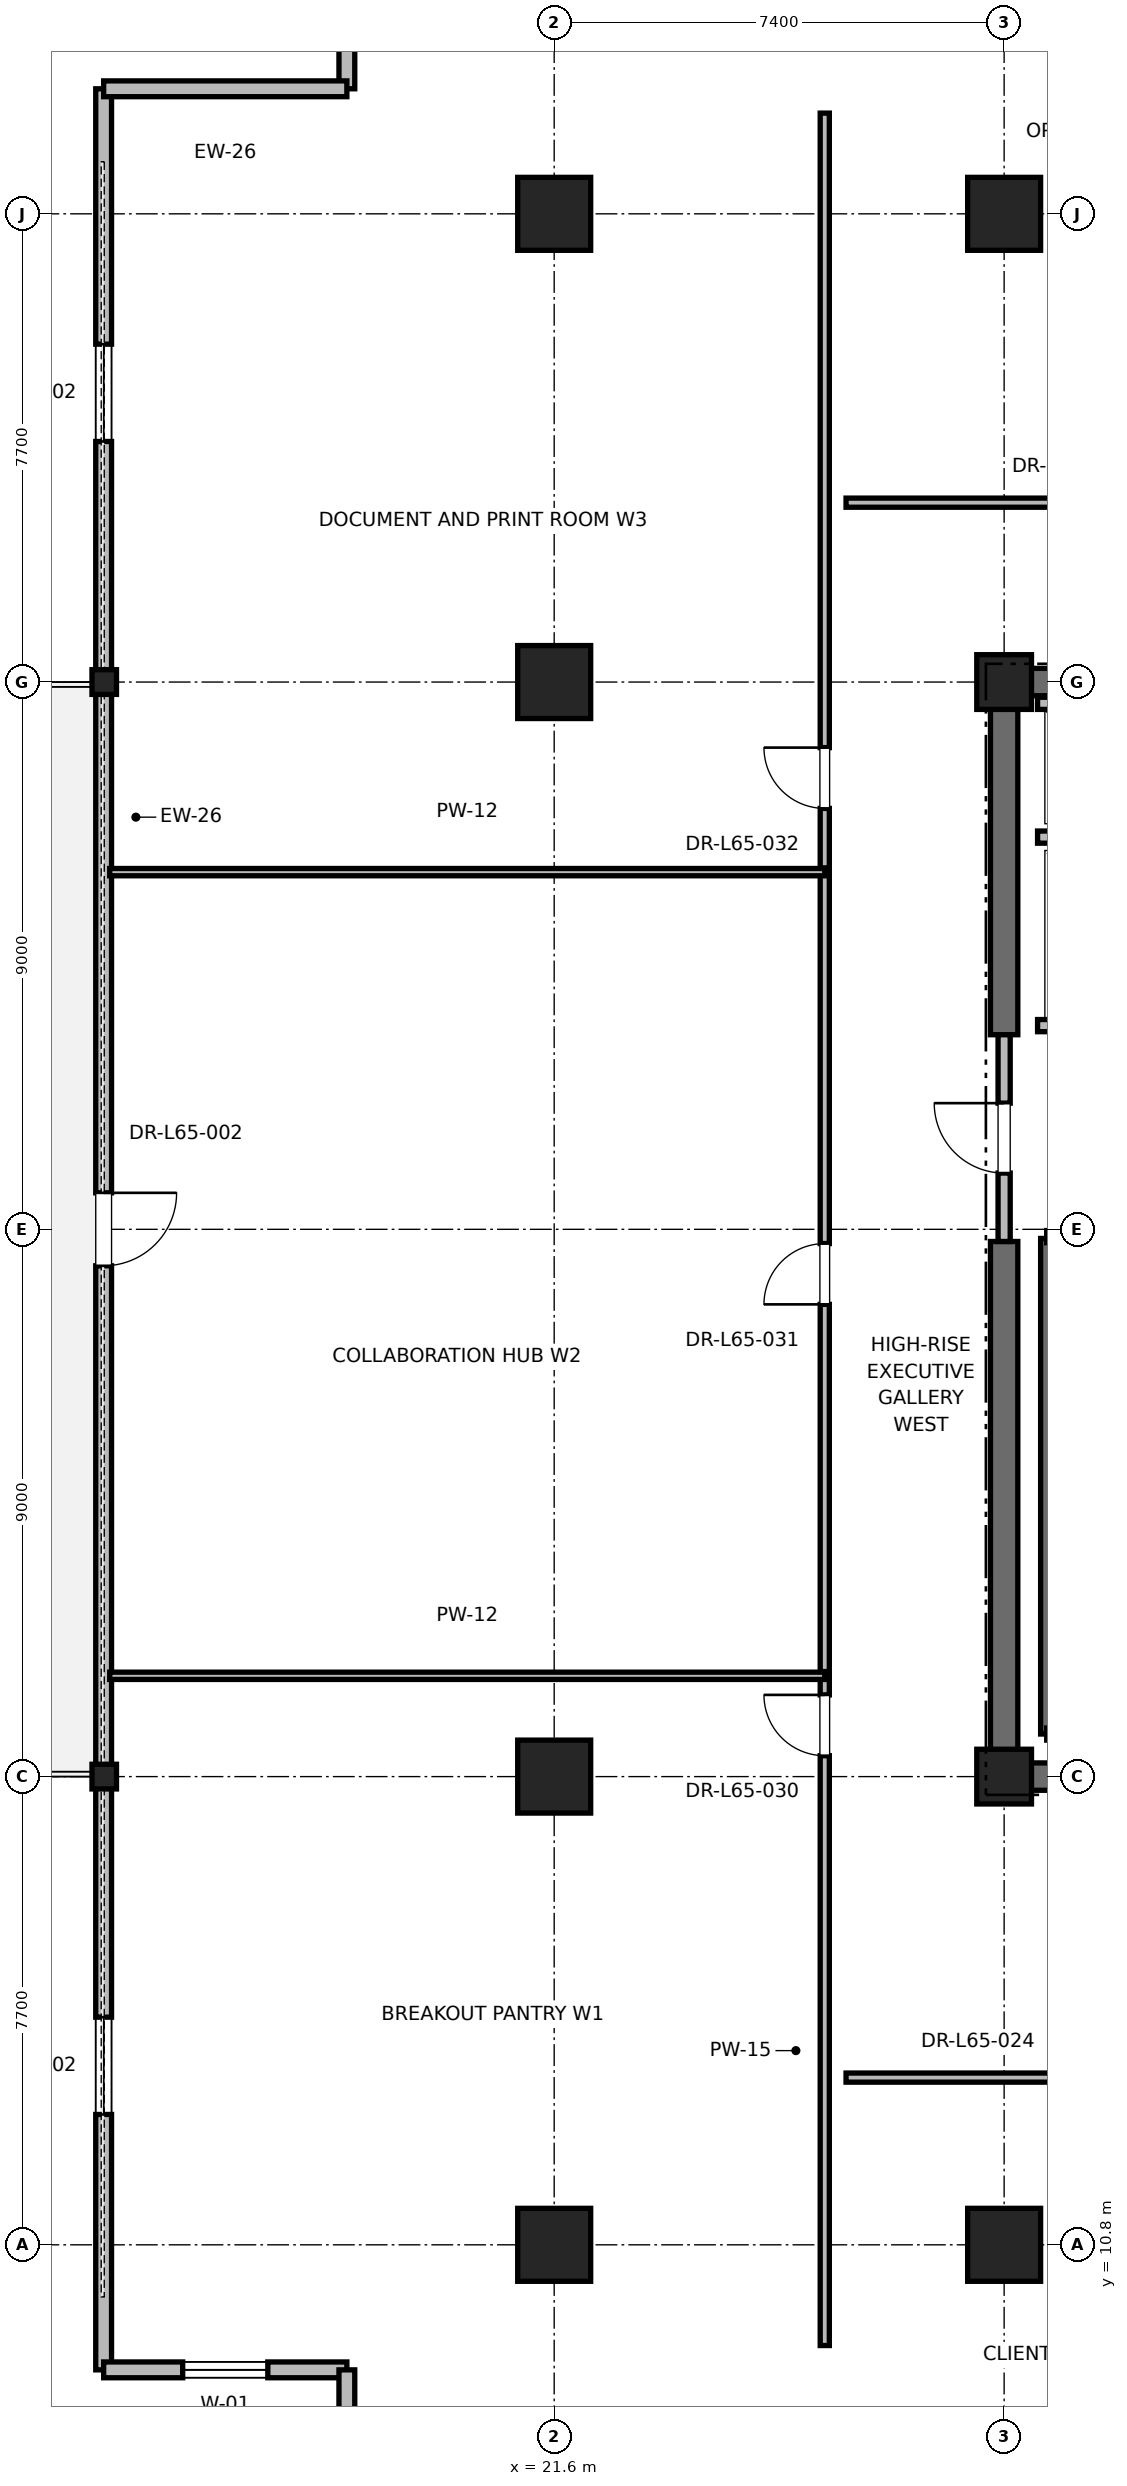
"""IFC4 building model, lengths in metres.
Left out: names, types, materials, properties, quantities, classifications, styles, units other than length and angle.
Written with IfcOpenShell. Run it as: python <this file> out.ifc"""

import sys

from ifc_helpers import new_model, si_unit, direction, frame, frame_2d, origin, origin_2d, place, context, subcontext, project, spatial, rectangle, i_section, extrude, element, fill, save


model = new_model("IFC4")
c1 = context("Model", 3, precision=1e-05, world=origin(), true_north=direction((0.0, 1.0)))
c2 = subcontext(c1, "Body", "Model", "MODEL_VIEW")
j1 = project(units=[si_unit("LENGTHUNIT", "METRE"), si_unit("PLANEANGLEUNIT", "RADIAN")], contexts=[c1])
p1 = place(None, origin())
s1 = spatial("IfcSite", under=j1, at=p1, CompositionType="ELEMENT")
p2 = place(p1, origin())
s2 = spatial("IfcBuilding", under=s1, at=p2, CompositionType="ELEMENT")
p3 = place(p2, frame((0.0, 0.0, 279.2)))
s3 = spatial("IfcBuildingStorey", under=s2, at=p3, CompositionType="ELEMENT", Elevation=279.2)
for number, where, z_axis, x_axis in (
    (1, (29.0, 10.8, 0.0), (0.0, 0.0, 1.0), (1.0, 0.0, 0.0)),
    (2, (29.0, 44.2, 0.0), (0.0, 0.0, 1.0), (1.0, 0.0, 0.0)),
    (3, (21.6, 18.5, 0.0), (0.0, 0.0, 1.0), (1.0, 0.0, 0.0)),
    (4, (21.6, 36.5, 0.0), (0.0, 0.0, 1.0), (1.0, 0.0, 0.0)),
    (5, (21.6, 10.8, 0.0), (0.0, 0.0, 1.0), (1.0, 0.0, 0.0)),
    (6, (21.6, 44.2, 0.0), (0.0, 0.0, 1.0), (1.0, 0.0, 0.0)),
):
    element("IfcColumn", number, at=place(p3, frame(where, z_axis=z_axis, x_axis=x_axis)), inside=s3, PredefinedType="COLUMN", context=c2, shape_type="SweptSolid", body=[
        extrude(rectangle(XDim=1.2, YDim=1.2, at=origin_2d()), origin(), (0.0, 0.0, 1.0), 4.0),
    ])
for number, where, z_axis, x_axis in (
    (7, (14.2, 18.5, 0.0), (0.0, 0.0, 1.0), (1.0, 0.0, 0.0)),
    (8, (14.2, 36.5, 0.0), (0.0, 0.0, 1.0), (1.0, 0.0, 0.0)),
):
    element("IfcColumn", number, at=place(p3, frame(where, z_axis=z_axis, x_axis=x_axis)), inside=s3, PredefinedType="COLUMN", context=c2, shape_type="SweptSolid", body=[
        extrude(i_section(OverallWidth=0.403, OverallDepth=0.406, WebThickness=0.027, FlangeThickness=0.043, FilletRadius=0.015, at=origin_2d()), origin(), (0.0, 0.0, 1.0), 4.0),
    ])
for number, where, z_axis, x_axis in (
    (9, (29.0, 18.5, 0.0), (0.0, 0.0, 1.0), (1.0, 0.0, 0.0)),
    (10, (29.0, 36.5, 0.0), (0.0, 0.0, 1.0), (1.0, 0.0, 0.0)),
):
    element("IfcColumn", number, at=place(p3, frame(where, z_axis=z_axis, x_axis=x_axis)), inside=s3, PredefinedType="PILASTER", context=c2, shape_type="SweptSolid", body=[
        extrude(rectangle(XDim=0.9, YDim=0.9, at=origin_2d()), origin(), (0.0, 0.0, 1.0), 4.0),
    ])
p4 = place(p3, frame((29.0, 18.5, 0.0), z_axis=(0.0, 0.0, 1.0), x_axis=(1.0, 0.0, 0.0)))
e11 = element("IfcWall", 11, at=p4, inside=s3, PredefinedType="SHEAR", context=c2, shape_type="SweptSolid", body=[
    extrude(rectangle(XDim=9.2, YDim=0.45, at=frame_2d((4.6, 0.0))), origin(), (0.0, 0.0, 1.0), 3.785),
])
p5 = place(p3, frame((29.0, 36.5, 0.0), z_axis=(0.0, 0.0, 1.0), x_axis=(1.0, 0.0, 0.0)))
e12 = element("IfcWall", 12, at=p5, inside=s3, PredefinedType="SHEAR", context=c2, shape_type="SweptSolid", body=[
    extrude(rectangle(XDim=5.8, YDim=0.45, at=frame_2d((2.9, 0.0))), origin(), (0.0, 0.0, 1.0), 3.785),
])
p6 = place(p3, frame((29.0, 18.5, 0.0), z_axis=(0.0, 0.0, 1.0), x_axis=(0.0, 1.0, 0.0)))
e13 = element("IfcWall", 13, at=p6, inside=s3, PredefinedType="SHEAR", context=c2, shape_type="SweptSolid", body=[
    extrude(rectangle(XDim=8.8, YDim=0.45, at=frame_2d((4.4, 0.0))), origin(), (0.0, 0.0, 1.0), 3.785),
])
p7 = place(p3, frame((29.0, 30.7, 0.0), z_axis=(0.0, 0.0, 1.0), x_axis=(0.0, 1.0, 0.0)))
e14 = element("IfcWall", 14, at=p7, inside=s3, PredefinedType="SHEAR", context=c2, shape_type="SweptSolid", body=[
    extrude(rectangle(XDim=5.8, YDim=0.45, at=frame_2d((2.9, 0.0))), origin(), (0.0, 0.0, 1.0), 3.785),
])
p8 = place(p3, frame((14.19, 46.256, 0.0), z_axis=(0.0, 0.0, 1.0), x_axis=(0.0, -1.0, 0.0)))
e15 = element("IfcWall", 15, at=p8, inside=s3, PredefinedType="PARAPET", context=c2, shape_type="SweptSolid", body=[
    extrude(rectangle(XDim=37.513, YDim=0.26, at=frame_2d((18.756, 0.0))), origin(), (0.0, 0.0, 1.0), 3.123),
])
p9 = place(p8, frame((4.2, 0.0, 0.85)))
e16 = element("IfcOpeningElement", 16, at=p9, cuts=e15, PredefinedType="OPENING", context=c2, shape_type="SweptSolid", body=[
    extrude(rectangle(XDim=1.6, YDim=2.1, at=frame_2d((0.8, 1.05))), frame((0.0, 0.13, 0.0), z_axis=(0.0, -1.0, 0.0), x_axis=(1.0, 0.0, 0.0)), (0.0, 0.0, 1.0), 0.26),
])
p10 = place(p8, frame((18.156, 0.0, 0.0)))
e17 = element("IfcOpeningElement", 17, at=p10, cuts=e15, PredefinedType="OPENING", context=c2, shape_type="SweptSolid", body=[
    extrude(rectangle(XDim=1.2, YDim=2.2, at=frame_2d((0.6, 1.1))), frame((0.0, 0.13, 0.0), z_axis=(0.0, -1.0, 0.0), x_axis=(1.0, 0.0, 0.0)), (0.0, 0.0, 1.0), 0.26),
])
p11 = place(p8, frame((31.713, 0.0, 0.85)))
e18 = element("IfcOpeningElement", 18, at=p11, cuts=e15, PredefinedType="OPENING", context=c2, shape_type="SweptSolid", body=[
    extrude(rectangle(XDim=1.6, YDim=2.1, at=frame_2d((0.8, 1.05))), frame((0.0, 0.13, 0.0), z_axis=(0.0, -1.0, 0.0), x_axis=(1.0, 0.0, 0.0)), (0.0, 0.0, 1.0), 0.26),
])
p12 = place(p3, frame((14.19, 8.744, 0.0), z_axis=(0.0, 0.0, 1.0), x_axis=(1.0, 0.0, 0.0)))
e19 = element("IfcWall", 19, at=p12, inside=s3, PredefinedType="PARAPET", context=c2, shape_type="SweptSolid", body=[
    extrude(rectangle(XDim=4.0, YDim=0.26, at=frame_2d((2.0, 0.0))), origin(), (0.0, 0.0, 1.0), 3.785),
])
p13 = place(p12, frame((1.3, 0.0, 0.85)))
e20 = element("IfcOpeningElement", 20, at=p13, cuts=e19, PredefinedType="OPENING", context=c2, shape_type="SweptSolid", body=[
    extrude(rectangle(XDim=1.4, YDim=2.0, at=frame_2d((0.7, 1.0))), frame((0.0, 0.13, 0.0), z_axis=(0.0, -1.0, 0.0), x_axis=(1.0, 0.0, 0.0)), (0.0, 0.0, 1.0), 0.26),
])
p14 = place(p3, frame((18.19, 8.744, 0.0), z_axis=(0.0, 0.0, 1.0), x_axis=(0.0, -1.0, 0.0)))
e21 = element("IfcWall", 21, at=p14, inside=s3, PredefinedType="PARAPET", context=c2, shape_type="SweptSolid", body=[
    extrude(rectangle(XDim=3.5, YDim=0.26, at=frame_2d((1.75, 0.0))), origin(), (0.0, 0.0, 1.0), 3.785),
])
p15 = place(p3, frame((18.19, 49.756, 0.0), z_axis=(0.0, 0.0, 1.0), x_axis=(0.0, -1.0, 0.0)))
e22 = element("IfcWall", 22, at=p15, inside=s3, PredefinedType="PARAPET", context=c2, shape_type="SweptSolid", body=[
    extrude(rectangle(XDim=3.5, YDim=0.26, at=frame_2d((1.75, 0.0))), origin(), (0.0, 0.0, 1.0), 3.785),
])
p16 = place(p15, frame((1.05, 0.0, 0.85)))
e23 = element("IfcOpeningElement", 23, at=p16, cuts=e22, PredefinedType="OPENING", context=c2, shape_type="SweptSolid", body=[
    extrude(rectangle(XDim=1.4, YDim=2.0, at=frame_2d((0.7, 1.0))), frame((0.0, 0.13, 0.0), z_axis=(0.0, -1.0, 0.0), x_axis=(1.0, 0.0, 0.0)), (0.0, 0.0, 1.0), 0.26),
])
p17 = place(p3, frame((18.19, 46.256, 0.0), z_axis=(0.0, 0.0, 1.0), x_axis=(-1.0, 0.0, 0.0)))
e24 = element("IfcWall", 24, at=p17, inside=s3, PredefinedType="PARAPET", context=c2, shape_type="SweptSolid", body=[
    extrude(rectangle(XDim=4.0, YDim=0.26, at=frame_2d((2.0, 0.0))), origin(), (0.0, 0.0, 1.0), 3.785),
])
p18 = place(p3, frame((29.7, 19.2, 0.0), z_axis=(0.0, 0.0, 1.0), x_axis=(0.0, 1.0, 0.0)))
e25 = element("IfcWall", 25, at=p18, inside=s3, PredefinedType="SOLIDWALL", context=c2, shape_type="SweptSolid", body=[
    extrude(rectangle(XDim=8.15, YDim=0.2, at=frame_2d((4.075, 0.0))), origin(), (0.0, 0.0, 1.0), 3.785),
])
p19 = place(p3, frame((29.0, 27.3, 0.0), z_axis=(0.0, 0.0, 1.0), x_axis=(0.0, 1.0, 0.0)))
e26 = element("IfcWall", 26, at=p19, inside=s3, PredefinedType="PARTITIONING", context=c2, shape_type="SweptSolid", body=[
    extrude(rectangle(XDim=3.4, YDim=0.2, at=frame_2d((1.7, 0.0))), origin(), (0.0, 0.0, 1.0), 2.865),
])
p20 = place(p19, frame((1.125, 0.0, 0.0)))
e27 = element("IfcOpeningElement", 27, at=p20, cuts=e26, PredefinedType="OPENING", context=c2, shape_type="SweptSolid", body=[
    extrude(rectangle(XDim=1.15, YDim=2.2, at=frame_2d((0.575, 1.1))), frame((0.0, 0.1, 0.0), z_axis=(0.0, -1.0, 0.0), x_axis=(1.0, 0.0, 0.0)), (0.0, 0.0, 1.0), 0.2),
])
p21 = place(p3, frame((29.55, 30.85, 0.0), z_axis=(0.0, 0.0, 1.0), x_axis=(1.0, 0.0, 0.0)))
e28 = element("IfcWall", 28, at=p21, inside=s3, PredefinedType="SOLIDWALL", context=c2, shape_type="SweptSolid", body=[
    extrude(rectangle(XDim=2.6, YDim=0.2, at=frame_2d((1.3, 0.0))), origin(), (0.0, 0.0, 1.0), 2.865),
])
p22 = place(p21, frame((0.75, 0.0, 0.0)))
e29 = element("IfcOpeningElement", 29, at=p22, cuts=e28, PredefinedType="OPENING", context=c2, shape_type="SweptSolid", body=[
    extrude(rectangle(XDim=1.1, YDim=2.2, at=frame_2d((0.55, 1.1))), frame((0.0, 0.1, 0.0), z_axis=(0.0, -1.0, 0.0), x_axis=(1.0, 0.0, 0.0)), (0.0, 0.0, 1.0), 0.2),
])
p23 = place(p3, frame((29.55, 33.95, 0.0), z_axis=(0.0, 0.0, 1.0), x_axis=(1.0, 0.0, 0.0)))
e30 = element("IfcWall", 30, at=p23, inside=s3, PredefinedType="SOLIDWALL", context=c2, shape_type="SweptSolid", body=[
    extrude(rectangle(XDim=2.8, YDim=0.2, at=frame_2d((1.4, 0.0))), origin(), (0.0, 0.0, 1.0), 3.785),
])
p24 = place(p3, frame((32.35, 36.15, 0.0), z_axis=(0.0, 0.0, 1.0), x_axis=(-1.0, 0.0, 0.0)))
e31 = element("IfcWall", 31, at=p24, inside=s3, PredefinedType="SOLIDWALL", context=c2, shape_type="SweptSolid", body=[
    extrude(rectangle(XDim=2.8, YDim=0.2, at=frame_2d((1.4, 0.0))), origin(), (0.0, 0.0, 1.0), 3.148),
])
p25 = place(p3, frame((26.4, 39.45, 0.0), z_axis=(0.0, 0.0, 1.0), x_axis=(1.0, 0.0, 0.0)))
e32 = element("IfcWall", 32, at=p25, inside=s3, PredefinedType="PARTITIONING", context=c2, shape_type="SweptSolid", body=[
    extrude(rectangle(XDim=11.424, YDim=0.15, at=frame_2d((5.712, 0.0))), origin(), (0.0, 0.0, 1.0), 2.85),
])
p26 = place(p25, frame((5.227, 0.0, 0.0)))
e33 = element("IfcOpeningElement", 33, at=p26, cuts=e32, PredefinedType="OPENING", context=c2, shape_type="SweptSolid", body=[
    extrude(rectangle(XDim=1.0, YDim=2.15, at=frame_2d((0.5, 1.075))), frame((0.0, 0.075, 0.0), z_axis=(0.0, -1.0, 0.0), x_axis=(1.0, 0.0, 0.0)), (0.0, 0.0, 1.0), 0.15),
])
p27 = place(p3, frame((26.4, 13.55, 0.0), z_axis=(0.0, 0.0, 1.0), x_axis=(1.0, 0.0, 0.0)))
e34 = element("IfcWall", 34, at=p27, inside=s3, PredefinedType="PARTITIONING", context=c2, shape_type="SweptSolid", body=[
    extrude(rectangle(XDim=8.432, YDim=0.15, at=frame_2d((4.216, 0.0))), origin(), (0.0, 0.0, 1.0), 2.85),
])
p28 = place(p27, frame((3.481, 0.0, 0.0)))
e35 = element("IfcOpeningElement", 35, at=p28, cuts=e34, PredefinedType="OPENING", context=c2, shape_type="SweptSolid", body=[
    extrude(rectangle(XDim=1.5, YDim=2.25, at=frame_2d((0.75, 1.125))), frame((0.0, 0.075, 0.0), z_axis=(0.0, -1.0, 0.0), x_axis=(1.0, 0.0, 0.0)), (0.0, 0.0, 1.0), 0.15),
])
p29 = place(p3, frame((26.05, 9.144, 0.0), z_axis=(0.0, 0.0, 1.0), x_axis=(0.0, 1.0, 0.0)))
e36 = element("IfcWall", 36, at=p29, inside=s3, PredefinedType="PARTITIONING", context=c2, shape_type="SweptSolid", body=[
    extrude(rectangle(XDim=11.014, YDim=0.15, at=frame_2d((5.507, 0.0))), origin(), (0.0, 0.0, 1.0), 2.85),
])
p30 = place(p29, frame((9.7, 0.0, 0.0)))
e37 = element("IfcOpeningElement", 37, at=p30, cuts=e36, PredefinedType="OPENING", context=c2, shape_type="SweptSolid", body=[
    extrude(rectangle(XDim=1.0, YDim=2.15, at=frame_2d((0.5, 1.075))), frame((0.0, 0.075, 0.0), z_axis=(0.0, -1.0, 0.0), x_axis=(1.0, 0.0, 0.0)), (0.0, 0.0, 1.0), 0.15),
])
p31 = place(p3, frame((14.29, 20.157, 0.0), z_axis=(0.0, 0.0, 1.0), x_axis=(1.0, 0.0, 0.0)))
e38 = element("IfcWall", 38, at=p31, inside=s3, PredefinedType="PARTITIONING", context=c2, shape_type="SweptSolid", body=[
    extrude(rectangle(XDim=11.76, YDim=0.12, at=frame_2d((5.88, 0.0))), origin(), (0.0, 0.0, 1.0), 2.85),
])
p32 = place(p3, frame((26.05, 20.228, 0.0), z_axis=(0.0, 0.0, 1.0), x_axis=(0.0, 1.0, 0.0)))
e39 = element("IfcWall", 39, at=p32, inside=s3, PredefinedType="PARTITIONING", context=c2, shape_type="SweptSolid", body=[
    extrude(rectangle(XDim=13.146, YDim=0.15, at=frame_2d((6.573, 0.0))), origin(), (0.0, 0.0, 1.0), 2.85),
])
p33 = place(p32, frame((6.038, 0.0, 0.0)))
e40 = element("IfcOpeningElement", 40, at=p33, cuts=e39, PredefinedType="OPENING", context=c2, shape_type="SweptSolid", body=[
    extrude(rectangle(XDim=1.0, YDim=2.15, at=frame_2d((0.5, 1.075))), frame((0.0, 0.075, 0.0), z_axis=(0.0, -1.0, 0.0), x_axis=(1.0, 0.0, 0.0)), (0.0, 0.0, 1.0), 0.15),
])
p34 = place(p3, frame((14.29, 33.374, 0.0), z_axis=(0.0, 0.0, 1.0), x_axis=(1.0, 0.0, 0.0)))
e41 = element("IfcWall", 41, at=p34, inside=s3, PredefinedType="PARTITIONING", context=c2, shape_type="SweptSolid", body=[
    extrude(rectangle(XDim=11.76, YDim=0.12, at=frame_2d((5.88, 0.0))), origin(), (0.0, 0.0, 1.0), 2.85),
])
p35 = place(p3, frame((26.05, 33.444, 0.0), z_axis=(0.0, 0.0, 1.0), x_axis=(0.0, 1.0, 0.0)))
e42 = element("IfcWall", 42, at=p35, inside=s3, PredefinedType="PARTITIONING", context=c2, shape_type="SweptSolid", body=[
    extrude(rectangle(XDim=12.412, YDim=0.15, at=frame_2d((6.206, 0.0))), origin(), (0.0, 0.0, 1.0), 2.85),
])
p36 = place(p35, frame((0.978, 0.0, 0.0)))
e43 = element("IfcOpeningElement", 43, at=p36, cuts=e42, PredefinedType="OPENING", context=c2, shape_type="SweptSolid", body=[
    extrude(rectangle(XDim=1.0, YDim=2.15, at=frame_2d((0.5, 1.075))), frame((0.0, 0.075, 0.0), z_axis=(0.0, -1.0, 0.0), x_axis=(1.0, 0.0, 0.0)), (0.0, 0.0, 1.0), 0.15),
])
p37 = place(p9, origin())
e44 = element("IfcWindow", 44, at=p37, inside=s3, PartitioningType="SINGLE_PANEL", PredefinedType="WINDOW", context=c2, shape_type="SweptSolid", body=[
    extrude(rectangle(XDim=1.6, YDim=2.1, at=frame_2d((0.8, 1.05))), frame((0.0, 0.03, 0.0), z_axis=(0.0, -1.0, 0.0), x_axis=(1.0, 0.0, 0.0)), (0.0, 0.0, 1.0), 0.06),
])
fill(e16, e44)
p38 = place(p10, origin())
e45 = element("IfcDoor", 45, at=p38, inside=s3, OperationType="SINGLE_SWING_LEFT", PredefinedType="DOOR", context=c2, shape_type="SweptSolid", body=[
    extrude(rectangle(XDim=1.2, YDim=2.2, at=frame_2d((0.6, 1.1))), frame((0.0, 0.025, 0.0), z_axis=(0.0, -1.0, 0.0), x_axis=(1.0, 0.0, 0.0)), (0.0, 0.0, 1.0), 0.05),
])
fill(e17, e45)
p39 = place(p11, origin())
e46 = element("IfcWindow", 46, at=p39, inside=s3, PartitioningType="SINGLE_PANEL", PredefinedType="WINDOW", context=c2, shape_type="SweptSolid", body=[
    extrude(rectangle(XDim=1.6, YDim=2.1, at=frame_2d((0.8, 1.05))), frame((0.0, 0.03, 0.0), z_axis=(0.0, -1.0, 0.0), x_axis=(1.0, 0.0, 0.0)), (0.0, 0.0, 1.0), 0.06),
])
fill(e18, e46)
p40 = place(p13, origin())
e47 = element("IfcWindow", 47, at=p40, inside=s3, PartitioningType="SINGLE_PANEL", PredefinedType="WINDOW", context=c2, shape_type="SweptSolid", body=[
    extrude(rectangle(XDim=1.4, YDim=2.0, at=frame_2d((0.7, 1.0))), frame((0.0, 0.03, 0.0), z_axis=(0.0, -1.0, 0.0), x_axis=(1.0, 0.0, 0.0)), (0.0, 0.0, 1.0), 0.06),
])
fill(e20, e47)
p41 = place(p20, origin())
e48 = element("IfcDoor", 48, at=p41, inside=s3, OperationType="SINGLE_SWING_RIGHT", PredefinedType="DOOR", context=c2, shape_type="SweptSolid", body=[
    extrude(rectangle(XDim=1.15, YDim=2.2, at=frame_2d((0.575, 1.1))), frame((0.0, 0.025, 0.0), z_axis=(0.0, -1.0, 0.0), x_axis=(1.0, 0.0, 0.0)), (0.0, 0.0, 1.0), 0.05),
])
fill(e27, e48)
p42 = place(p30, origin())
e49 = element("IfcDoor", 49, at=p42, inside=s3, OperationType="SINGLE_SWING_RIGHT", PredefinedType="DOOR", context=c2, shape_type="SweptSolid", body=[
    extrude(rectangle(XDim=1.0, YDim=2.15, at=frame_2d((0.5, 1.075))), frame((0.0, 0.025, 0.0), z_axis=(0.0, -1.0, 0.0), x_axis=(1.0, 0.0, 0.0)), (0.0, 0.0, 1.0), 0.05),
])
fill(e37, e49)
p43 = place(p33, origin())
e50 = element("IfcDoor", 50, at=p43, inside=s3, OperationType="SINGLE_SWING_LEFT", PredefinedType="DOOR", context=c2, shape_type="SweptSolid", body=[
    extrude(rectangle(XDim=1.0, YDim=2.15, at=frame_2d((0.5, 1.075))), frame((0.0, 0.025, 0.0), z_axis=(0.0, -1.0, 0.0), x_axis=(1.0, 0.0, 0.0)), (0.0, 0.0, 1.0), 0.05),
])
fill(e40, e50)
p44 = place(p36, origin())
e51 = element("IfcDoor", 51, at=p44, inside=s3, OperationType="SINGLE_SWING_RIGHT", PredefinedType="DOOR", context=c2, shape_type="SweptSolid", body=[
    extrude(rectangle(XDim=1.0, YDim=2.15, at=frame_2d((0.5, 1.075))), frame((0.0, 0.025, 0.0), z_axis=(0.0, -1.0, 0.0), x_axis=(1.0, 0.0, 0.0)), (0.0, 0.0, 1.0), 0.05),
])
fill(e43, e51)
save(model, sys.argv[1])
